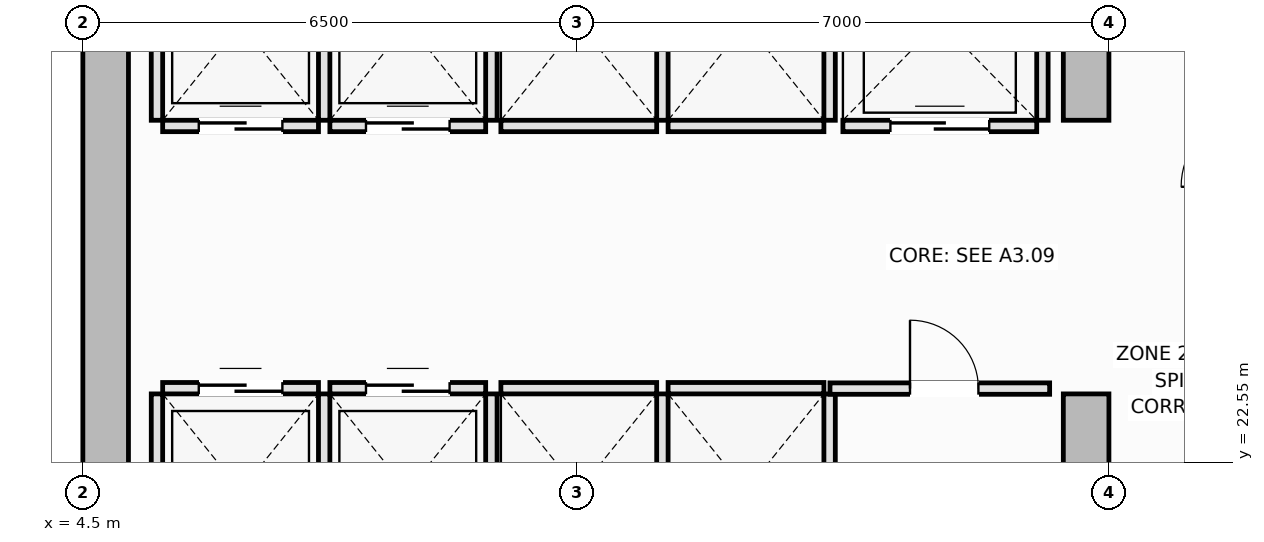
"""IFC4 building model, lengths in metres.
Left out: names, types, materials, properties, quantities, classifications, styles, units other than length and angle.
Written with IfcOpenShell. Run it as: python <this file> out.ifc"""

import sys

from ifc_helpers import new_model, si_unit, direction, frame, frame_2d, origin, place, context, subcontext, project, spatial, rectangle, extrude, element, fill, save


model = new_model("IFC4")
c1 = context("Model", 3, precision=1e-05, world=origin(), true_north=direction((0.0, 1.0)))
c2 = subcontext(c1, "Body", "Model", "MODEL_VIEW")
j1 = project(units=[si_unit("LENGTHUNIT", "METRE"), si_unit("PLANEANGLEUNIT", "RADIAN")], contexts=[c1])
p1 = place(None, origin())
s1 = spatial("IfcSite", under=j1, at=p1, CompositionType="ELEMENT")
p2 = place(p1, origin())
s2 = spatial("IfcBuilding", under=s1, at=p2, CompositionType="ELEMENT")
p3 = place(p2, frame((0.0, 0.0, 127.1)))
s3 = spatial("IfcBuildingStorey", under=s2, at=p3, CompositionType="ELEMENT", Elevation=127.1)
p4 = place(p3, frame((4.8, 14.6, 0.0), z_axis=(0.0, 0.0, 1.0), x_axis=(0.0, 1.0, 0.0)))
e1 = element("IfcWall", 1, at=p4, inside=s3, PredefinedType="SHEAR", context=c2, shape_type="SweptSolid", body=[
    extrude(rectangle(XDim=21.3, YDim=0.6, at=frame_2d((10.65, 0.0))), origin(), (0.0, 0.0, 1.0), 3.55),
])
p5 = place(p3, frame((17.7, 14.6, 0.0), z_axis=(0.0, 0.0, 1.0), x_axis=(0.0, 1.0, 0.0)))
e2 = element("IfcWall", 2, at=p5, inside=s3, PredefinedType="SHEAR", context=c2, shape_type="SweptSolid", body=[
    extrude(rectangle(XDim=8.85, YDim=0.6, at=frame_2d((4.425, 0.0))), origin(), (0.0, 0.0, 1.0), 3.55),
])
p6 = place(p5, frame((4.3, 0.0, 0.0)))
e3 = element("IfcOpeningElement", 3, at=p6, cuts=e2, PredefinedType="OPENING", context=c2, shape_type="SweptSolid", body=[
    extrude(rectangle(XDim=1.1, YDim=2.15, at=frame_2d((0.55, 1.075))), frame((0.0, 0.31, 0.0), z_axis=(0.0, -1.0, 0.0), x_axis=(1.0, 0.0, 0.0)), (0.0, 0.0, 1.0), 0.62),
])
p7 = place(p3, frame((17.7, 27.05, 0.0), z_axis=(0.0, 0.0, 1.0), x_axis=(0.0, 1.0, 0.0)))
e4 = element("IfcWall", 4, at=p7, inside=s3, PredefinedType="SHEAR", context=c2, shape_type="SweptSolid", body=[
    extrude(rectangle(XDim=8.85, YDim=0.6, at=frame_2d((4.425, 0.0))), origin(), (0.0, 0.0, 1.0), 3.55),
])
p8 = place(p7, frame((3.45, 0.0, 0.0)))
e5 = element("IfcOpeningElement", 5, at=p8, cuts=e4, PredefinedType="OPENING", context=c2, shape_type="SweptSolid", body=[
    extrude(rectangle(XDim=1.1, YDim=2.15, at=frame_2d((0.55, 1.075))), frame((0.0, 0.31, 0.0), z_axis=(0.0, -1.0, 0.0), x_axis=(1.0, 0.0, 0.0)), (0.0, 0.0, 1.0), 0.62),
])
p9 = place(p3, frame((5.55, 23.525, 0.0), z_axis=(0.0, 0.0, 1.0), x_axis=(1.0, 0.0, 0.0)))
e6 = element("IfcWall", 6, at=p9, inside=s3, PredefinedType="PARTITIONING", context=c2, shape_type="SweptSolid", body=[
    extrude(rectangle(XDim=2.05, YDim=0.15, at=frame_2d((1.025, 0.0))), origin(), (0.0, 0.0, 1.0), 3.37),
])
p10 = place(p9, frame((0.475, 0.0, 0.0)))
e7 = element("IfcOpeningElement", 7, at=p10, cuts=e6, PredefinedType="OPENING", context=c2, shape_type="SweptSolid", body=[
    extrude(rectangle(XDim=1.1, YDim=2.2, at=frame_2d((0.55, 1.1))), frame((0.0, 0.085, 0.0), z_axis=(0.0, -1.0, 0.0), x_axis=(1.0, 0.0, 0.0)), (0.0, 0.0, 1.0), 0.17),
])
for number, where, z_axis, x_axis in (
    (8, (5.475, 20.9, 0.0), (0.0, 0.0, 1.0), (0.0, 1.0, 0.0)),
    (9, (7.675, 20.9, 0.0), (0.0, 0.0, 1.0), (0.0, 1.0, 0.0)),
):
    element("IfcWall", number, at=place(p3, frame(where, z_axis=z_axis, x_axis=x_axis)), inside=s3, PredefinedType="PARTITIONING", context=c2, shape_type="SweptSolid", body=[
        extrude(rectangle(XDim=2.55, YDim=0.15, at=frame_2d((1.275, 0.0))), origin(), (0.0, 0.0, 1.0), 3.37),
    ])
p11 = place(p3, frame((7.75, 23.525, 0.0), z_axis=(0.0, 0.0, 1.0), x_axis=(1.0, 0.0, 0.0)))
e10 = element("IfcWall", 10, at=p11, inside=s3, PredefinedType="PARTITIONING", context=c2, shape_type="SweptSolid", body=[
    extrude(rectangle(XDim=2.05, YDim=0.15, at=frame_2d((1.025, 0.0))), origin(), (0.0, 0.0, 1.0), 3.37),
])
p12 = place(p11, frame((0.475, 0.0, 0.0)))
e11 = element("IfcOpeningElement", 11, at=p12, cuts=e10, PredefinedType="OPENING", context=c2, shape_type="SweptSolid", body=[
    extrude(rectangle(XDim=1.1, YDim=2.2, at=frame_2d((0.55, 1.1))), frame((0.0, 0.085, 0.0), z_axis=(0.0, -1.0, 0.0), x_axis=(1.0, 0.0, 0.0)), (0.0, 0.0, 1.0), 0.17),
])
p13 = place(p3, frame((9.875, 20.9, 0.0), z_axis=(0.0, 0.0, 1.0), x_axis=(0.0, 1.0, 0.0)))
e12 = element("IfcWall", 12, at=p13, inside=s3, PredefinedType="PARTITIONING", context=c2, shape_type="SweptSolid", body=[
    extrude(rectangle(XDim=2.55, YDim=0.15, at=frame_2d((1.275, 0.0))), origin(), (0.0, 0.0, 1.0), 3.37),
])
p14 = place(p3, frame((5.55, 26.975, 0.0), z_axis=(0.0, 0.0, 1.0), x_axis=(1.0, 0.0, 0.0)))
e13 = element("IfcWall", 13, at=p14, inside=s3, PredefinedType="PARTITIONING", context=c2, shape_type="SweptSolid", body=[
    extrude(rectangle(XDim=2.05, YDim=0.15, at=frame_2d((1.025, 0.0))), origin(), (0.0, 0.0, 1.0), 3.37),
])
p15 = place(p14, frame((0.475, 0.0, 0.0)))
e14 = element("IfcOpeningElement", 14, at=p15, cuts=e13, PredefinedType="OPENING", context=c2, shape_type="SweptSolid", body=[
    extrude(rectangle(XDim=1.1, YDim=2.2, at=frame_2d((0.55, 1.1))), frame((0.0, 0.085, 0.0), z_axis=(0.0, -1.0, 0.0), x_axis=(1.0, 0.0, 0.0)), (0.0, 0.0, 1.0), 0.17),
])
for number, where, z_axis, x_axis in (
    (15, (5.475, 27.05, 0.0), (0.0, 0.0, 1.0), (0.0, 1.0, 0.0)),
    (16, (7.675, 27.05, 0.0), (0.0, 0.0, 1.0), (0.0, 1.0, 0.0)),
):
    element("IfcWall", number, at=place(p3, frame(where, z_axis=z_axis, x_axis=x_axis)), inside=s3, PredefinedType="PARTITIONING", context=c2, shape_type="SweptSolid", body=[
        extrude(rectangle(XDim=2.55, YDim=0.15, at=frame_2d((1.275, 0.0))), origin(), (0.0, 0.0, 1.0), 3.37),
    ])
p16 = place(p3, frame((7.75, 26.975, 0.0), z_axis=(0.0, 0.0, 1.0), x_axis=(1.0, 0.0, 0.0)))
e17 = element("IfcWall", 17, at=p16, inside=s3, PredefinedType="PARTITIONING", context=c2, shape_type="SweptSolid", body=[
    extrude(rectangle(XDim=2.05, YDim=0.15, at=frame_2d((1.025, 0.0))), origin(), (0.0, 0.0, 1.0), 3.37),
])
p17 = place(p16, frame((0.475, 0.0, 0.0)))
e18 = element("IfcOpeningElement", 18, at=p17, cuts=e17, PredefinedType="OPENING", context=c2, shape_type="SweptSolid", body=[
    extrude(rectangle(XDim=1.1, YDim=2.2, at=frame_2d((0.55, 1.1))), frame((0.0, 0.085, 0.0), z_axis=(0.0, -1.0, 0.0), x_axis=(1.0, 0.0, 0.0)), (0.0, 0.0, 1.0), 0.17),
])
p18 = place(p3, frame((9.875, 27.05, 0.0), z_axis=(0.0, 0.0, 1.0), x_axis=(0.0, 1.0, 0.0)))
e19 = element("IfcWall", 19, at=p18, inside=s3, PredefinedType="PARTITIONING", context=c2, shape_type="SweptSolid", body=[
    extrude(rectangle(XDim=2.55, YDim=0.15, at=frame_2d((1.275, 0.0))), origin(), (0.0, 0.0, 1.0), 3.37),
])
p19 = place(p3, frame((10.0, 23.525, 0.0), z_axis=(0.0, 0.0, 1.0), x_axis=(1.0, 0.0, 0.0)))
e20 = element("IfcWall", 20, at=p19, inside=s3, PredefinedType="PARTITIONING", context=c2, shape_type="SweptSolid", body=[
    extrude(rectangle(XDim=2.05, YDim=0.15, at=frame_2d((1.025, 0.0))), origin(), (0.0, 0.0, 1.0), 3.37),
])
p20 = place(p3, frame((12.125, 20.9, 0.0), z_axis=(0.0, 0.0, 1.0), x_axis=(0.0, 1.0, 0.0)))
e21 = element("IfcWall", 21, at=p20, inside=s3, PredefinedType="PARTITIONING", context=c2, shape_type="SweptSolid", body=[
    extrude(rectangle(XDim=2.55, YDim=0.15, at=frame_2d((1.275, 0.0))), origin(), (0.0, 0.0, 1.0), 3.37),
])
p21 = place(p3, frame((12.2, 23.525, 0.0), z_axis=(0.0, 0.0, 1.0), x_axis=(1.0, 0.0, 0.0)))
e22 = element("IfcWall", 22, at=p21, inside=s3, PredefinedType="PARTITIONING", context=c2, shape_type="SweptSolid", body=[
    extrude(rectangle(XDim=2.05, YDim=0.15, at=frame_2d((1.025, 0.0))), origin(), (0.0, 0.0, 1.0), 3.37),
])
p22 = place(p3, frame((14.325, 20.9, 0.0), z_axis=(0.0, 0.0, 1.0), x_axis=(0.0, 1.0, 0.0)))
e23 = element("IfcWall", 23, at=p22, inside=s3, PredefinedType="PARTITIONING", context=c2, shape_type="SweptSolid", body=[
    extrude(rectangle(XDim=2.55, YDim=0.15, at=frame_2d((1.275, 0.0))), origin(), (0.0, 0.0, 1.0), 3.37),
])
p23 = place(p3, frame((10.0, 26.975, 0.0), z_axis=(0.0, 0.0, 1.0), x_axis=(1.0, 0.0, 0.0)))
e24 = element("IfcWall", 24, at=p23, inside=s3, PredefinedType="PARTITIONING", context=c2, shape_type="SweptSolid", body=[
    extrude(rectangle(XDim=2.05, YDim=0.15, at=frame_2d((1.025, 0.0))), origin(), (0.0, 0.0, 1.0), 3.37),
])
p24 = place(p3, frame((12.125, 27.05, 0.0), z_axis=(0.0, 0.0, 1.0), x_axis=(0.0, 1.0, 0.0)))
e25 = element("IfcWall", 25, at=p24, inside=s3, PredefinedType="PARTITIONING", context=c2, shape_type="SweptSolid", body=[
    extrude(rectangle(XDim=2.55, YDim=0.15, at=frame_2d((1.275, 0.0))), origin(), (0.0, 0.0, 1.0), 3.37),
])
p25 = place(p3, frame((12.2, 26.975, 0.0), z_axis=(0.0, 0.0, 1.0), x_axis=(1.0, 0.0, 0.0)))
e26 = element("IfcWall", 26, at=p25, inside=s3, PredefinedType="PARTITIONING", context=c2, shape_type="SweptSolid", body=[
    extrude(rectangle(XDim=2.05, YDim=0.15, at=frame_2d((1.025, 0.0))), origin(), (0.0, 0.0, 1.0), 3.37),
])
p26 = place(p3, frame((14.325, 27.05, 0.0), z_axis=(0.0, 0.0, 1.0), x_axis=(0.0, 1.0, 0.0)))
e27 = element("IfcWall", 27, at=p26, inside=s3, PredefinedType="PARTITIONING", context=c2, shape_type="SweptSolid", body=[
    extrude(rectangle(XDim=2.55, YDim=0.15, at=frame_2d((1.275, 0.0))), origin(), (0.0, 0.0, 1.0), 3.37),
])
p27 = place(p3, frame((14.5, 26.975, 0.0), z_axis=(0.0, 0.0, 1.0), x_axis=(1.0, 0.0, 0.0)))
e28 = element("IfcWall", 28, at=p27, inside=s3, PredefinedType="PARTITIONING", context=c2, shape_type="SweptSolid", body=[
    extrude(rectangle(XDim=2.55, YDim=0.15, at=frame_2d((1.275, 0.0))), origin(), (0.0, 0.0, 1.0), 3.37),
])
p28 = place(p27, frame((0.625, 0.0, 0.0)))
e29 = element("IfcOpeningElement", 29, at=p28, cuts=e28, PredefinedType="OPENING", context=c2, shape_type="SweptSolid", body=[
    extrude(rectangle(XDim=1.3, YDim=2.2, at=frame_2d((0.65, 1.1))), frame((0.0, 0.085, 0.0), z_axis=(0.0, -1.0, 0.0), x_axis=(1.0, 0.0, 0.0)), (0.0, 0.0, 1.0), 0.17),
])
p29 = place(p3, frame((17.125, 27.05, 0.0), z_axis=(0.0, 0.0, 1.0), x_axis=(0.0, 1.0, 0.0)))
e30 = element("IfcWall", 30, at=p29, inside=s3, PredefinedType="PARTITIONING", context=c2, shape_type="SweptSolid", body=[
    extrude(rectangle(XDim=2.6, YDim=0.15, at=frame_2d((1.3, 0.0))), origin(), (0.0, 0.0, 1.0), 3.37),
])
p30 = place(p3, frame((14.33, 23.52, 0.0), z_axis=(0.0, 0.0, 1.0), x_axis=(1.0, 0.0, 0.0)))
e31 = element("IfcWall", 31, at=p30, inside=s3, PredefinedType="PARTITIONING", context=c2, shape_type="SweptSolid", body=[
    extrude(rectangle(XDim=2.89, YDim=0.15, at=frame_2d((1.445, 0.0))), origin(), (0.0, 0.0, 1.0), 3.37),
])
p31 = place(p30, frame((1.053, 0.0, 0.0)))
e32 = element("IfcOpeningElement", 32, at=p31, cuts=e31, PredefinedType="OPENING", context=c2, shape_type="SweptSolid", body=[
    extrude(rectangle(XDim=0.9, YDim=2.1, at=frame_2d((0.45, 1.05))), frame((0.0, 0.085, 0.0), z_axis=(0.0, -1.0, 0.0), x_axis=(1.0, 0.0, 0.0)), (0.0, 0.0, 1.0), 0.17),
])
p32 = place(p10, origin())
e33 = element("IfcDoor", 33, at=p32, inside=s3, OperationType="DOUBLE_DOOR_SLIDING", PredefinedType="DOOR", context=c2, shape_type="SweptSolid", body=[
    extrude(rectangle(XDim=1.1, YDim=2.2, at=frame_2d((0.55, 1.1))), frame((0.0, 0.025, 0.0), z_axis=(0.0, -1.0, 0.0), x_axis=(1.0, 0.0, 0.0)), (0.0, 0.0, 1.0), 0.05),
])
fill(e7, e33)
p33 = place(p12, origin())
e34 = element("IfcDoor", 34, at=p33, inside=s3, OperationType="DOUBLE_DOOR_SLIDING", PredefinedType="DOOR", context=c2, shape_type="SweptSolid", body=[
    extrude(rectangle(XDim=1.1, YDim=2.2, at=frame_2d((0.55, 1.1))), frame((0.0, 0.025, 0.0), z_axis=(0.0, -1.0, 0.0), x_axis=(1.0, 0.0, 0.0)), (0.0, 0.0, 1.0), 0.05),
])
fill(e11, e34)
p34 = place(p15, origin())
e35 = element("IfcDoor", 35, at=p34, inside=s3, OperationType="DOUBLE_DOOR_SLIDING", PredefinedType="DOOR", context=c2, shape_type="SweptSolid", body=[
    extrude(rectangle(XDim=1.1, YDim=2.2, at=frame_2d((0.55, 1.1))), frame((0.0, 0.025, 0.0), z_axis=(0.0, -1.0, 0.0), x_axis=(1.0, 0.0, 0.0)), (0.0, 0.0, 1.0), 0.05),
])
fill(e14, e35)
p35 = place(p17, origin())
e36 = element("IfcDoor", 36, at=p35, inside=s3, OperationType="DOUBLE_DOOR_SLIDING", PredefinedType="DOOR", context=c2, shape_type="SweptSolid", body=[
    extrude(rectangle(XDim=1.1, YDim=2.2, at=frame_2d((0.55, 1.1))), frame((0.0, 0.025, 0.0), z_axis=(0.0, -1.0, 0.0), x_axis=(1.0, 0.0, 0.0)), (0.0, 0.0, 1.0), 0.05),
])
fill(e18, e36)
p36 = place(p28, origin())
e37 = element("IfcDoor", 37, at=p36, inside=s3, OperationType="DOUBLE_DOOR_SLIDING", PredefinedType="DOOR", context=c2, shape_type="SweptSolid", body=[
    extrude(rectangle(XDim=1.3, YDim=2.2, at=frame_2d((0.65, 1.1))), frame((0.0, 0.025, 0.0), z_axis=(0.0, -1.0, 0.0), x_axis=(1.0, 0.0, 0.0)), (0.0, 0.0, 1.0), 0.05),
])
fill(e29, e37)
p37 = place(p31, origin())
e38 = element("IfcDoor", 38, at=p37, inside=s3, OperationType="SINGLE_SWING_LEFT", PredefinedType="DOOR", context=c2, shape_type="SweptSolid", body=[
    extrude(rectangle(XDim=0.9, YDim=2.1, at=frame_2d((0.45, 1.05))), frame((0.0, 0.025, 0.0), z_axis=(0.0, -1.0, 0.0), x_axis=(1.0, 0.0, 0.0)), (0.0, 0.0, 1.0), 0.05),
])
fill(e32, e38)
save(model, sys.argv[1])
